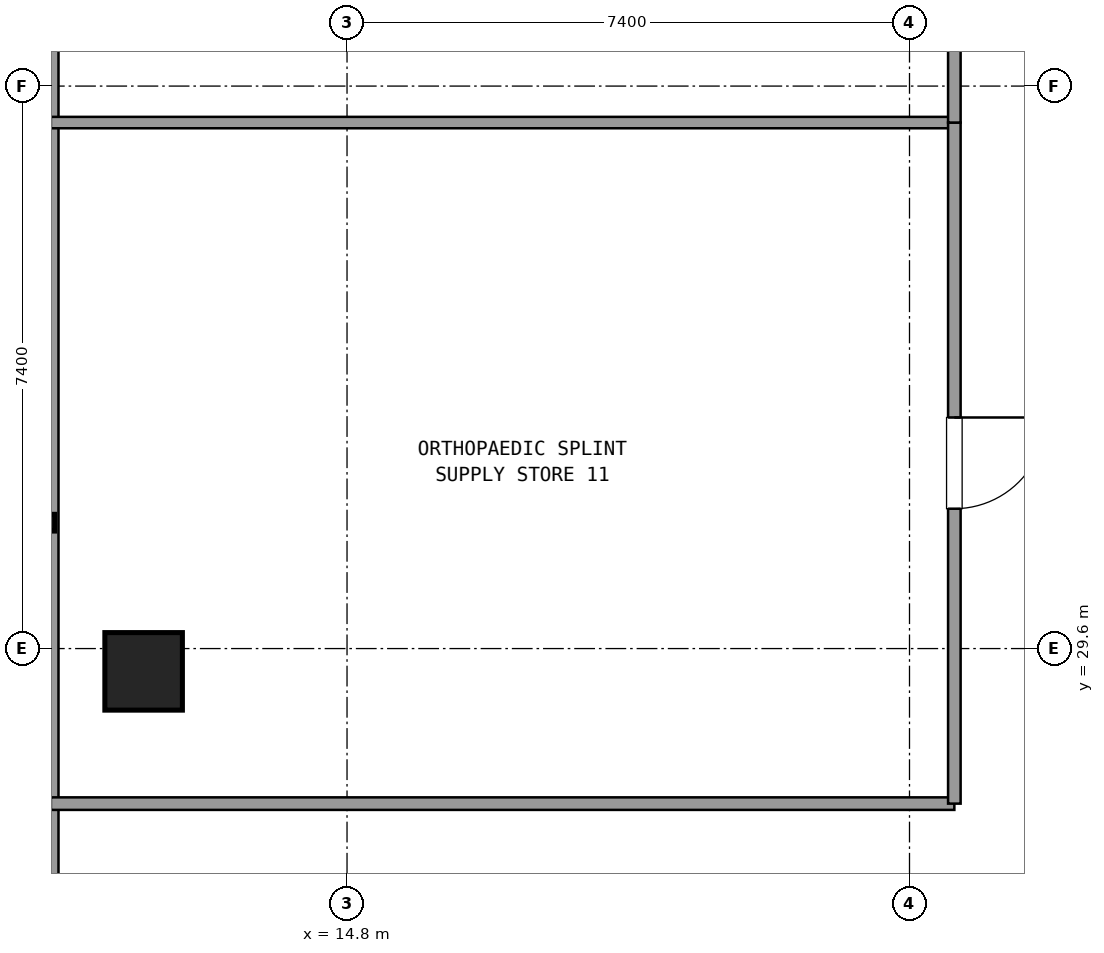
"""IFC4 building model, lengths in metres.
Left out: names, types, materials, properties, quantities, classifications, styles, units other than length and angle.
Written with IfcOpenShell. Run it as: python <this file> out.ifc"""

import sys

from ifc_helpers import new_model, si_unit, direction, frame, frame_2d, origin, origin_2d, place, context, subcontext, project, spatial, rectangle, extrude, element, fill, save


model = new_model("IFC4")
c1 = context("Model", 3, precision=1e-05, world=origin(), true_north=direction((0.0, 1.0)))
c2 = subcontext(c1, "Body", "Model", "MODEL_VIEW")
j1 = project(units=[si_unit("LENGTHUNIT", "METRE"), si_unit("PLANEANGLEUNIT", "RADIAN")], contexts=[c1])
p1 = place(None, origin())
s1 = spatial("IfcSite", under=j1, at=p1, CompositionType="ELEMENT")
p2 = place(p1, origin())
s2 = spatial("IfcBuilding", under=s1, at=p2, CompositionType="ELEMENT")
p3 = place(p2, frame((0.0, 0.0, 95.58)))
s3 = spatial("IfcBuildingStorey", under=s2, at=p3, CompositionType="ELEMENT", Elevation=95.58)
p4 = place(p3, frame((12.124, 29.3, 0.021), z_axis=(0.084850379912, 0.0, 0.996393703828), x_axis=(0.0, 1.0, 0.0)))
e1 = element("IfcColumn", 1, at=p4, inside=s3, PredefinedType="COLUMN", context=c2, shape_type="SweptSolid", body=[
    extrude(rectangle(XDim=1.02, YDim=1.02, at=origin_2d()), origin(), (0.0, 0.0, 1.0), 3.571),
])
p5 = place(p3, frame((10.884, 41.968, 0.0), z_axis=(0.0, 0.0, 1.0), x_axis=(0.0, -1.0, 0.0)))
e2 = element("IfcWall", 2, at=p5, inside=s3, PredefinedType="SOLIDWALL", context=c2, shape_type="SweptSolid", body=[
    extrude(rectangle(XDim=32.136, YDim=0.24, at=frame_2d((16.068, 0.0))), origin(), (0.0, 0.0, 1.0), 0.85),
])
p6 = place(p3, frame((10.904, 27.56, 0.0), z_axis=(0.0, 0.0, 1.0), x_axis=(1.0, 0.0, 0.0)))
e3 = element("IfcWall", 3, at=p6, inside=s3, PredefinedType="PARTITIONING", context=c2, shape_type="SweptSolid", body=[
    extrude(rectangle(XDim=11.886, YDim=0.165, at=frame_2d((5.943, 0.0))), origin(), (0.0, 0.0, 1.0), 2.61),
])
p7 = place(p3, frame((22.79, 36.52, 0.0), z_axis=(0.0, 0.0, 1.0), x_axis=(-1.0, 0.0, 0.0)))
e4 = element("IfcWall", 4, at=p7, inside=s3, PredefinedType="PARTITIONING", context=c2, shape_type="SweptSolid", body=[
    extrude(rectangle(XDim=11.886, YDim=0.15, at=frame_2d((5.943, 0.0))), origin(), (0.0, 0.0, 1.0), 2.61),
])
p8 = place(p3, frame((22.79, 27.56, 0.0), z_axis=(0.0, 0.0, 1.0), x_axis=(0.0, 1.0, 0.0)))
e5 = element("IfcWall", 5, at=p8, inside=s3, PredefinedType="PARTITIONING", context=c2, shape_type="SweptSolid", body=[
    extrude(rectangle(XDim=8.96, YDim=0.165, at=frame_2d((4.48, 0.0))), origin(), (0.0, 0.0, 1.0), 2.61),
])
p9 = place(p8, frame((3.88, 0.0, 0.0)))
e6 = element("IfcOpeningElement", 6, at=p9, cuts=e5, PredefinedType="OPENING", context=c2, shape_type="SweptSolid", body=[
    extrude(rectangle(XDim=1.2, YDim=2.15, at=frame_2d((0.6, 1.075))), frame((0.0, 0.093, 0.0), z_axis=(0.0, -1.0, 0.0), x_axis=(1.0, 0.0, 0.0)), (0.0, 0.0, 1.0), 0.185),
])
p10 = place(p3, frame((22.79, 36.52, 0.0), z_axis=(0.0, 0.0, 1.0), x_axis=(0.0, 1.0, 0.0)))
e7 = element("IfcWall", 7, at=p10, inside=s3, PredefinedType="PARTITIONING", context=c2, shape_type="SweptSolid", body=[
    extrude(rectangle(XDim=11.403, YDim=0.165, at=frame_2d((5.702, 0.0))), origin(), (0.0, 0.0, 1.0), 2.61),
])
p11 = place(p10, frame((5.101, 0.0, 0.0)))
e8 = element("IfcOpeningElement", 8, at=p11, cuts=e7, PredefinedType="OPENING", context=c2, shape_type="SweptSolid", body=[
    extrude(rectangle(XDim=1.2, YDim=2.15, at=frame_2d((0.6, 1.075))), frame((0.0, 0.093, 0.0), z_axis=(0.0, -1.0, 0.0), x_axis=(1.0, 0.0, 0.0)), (0.0, 0.0, 1.0), 0.185),
])
p12 = place(p9, frame((1.2, 0.0, 0.0), z_axis=(0.0, 0.0, 1.0), x_axis=(-1.0, 0.0, 0.0)))
e9 = element("IfcDoor", 9, at=p12, inside=s3, OperationType="SINGLE_SWING_RIGHT", PredefinedType="DOOR", context=c2, shape_type="SweptSolid", body=[
    extrude(rectangle(XDim=1.2, YDim=2.15, at=frame_2d((0.6, 1.075))), frame((0.0, 0.025, 0.0), z_axis=(0.0, -1.0, 0.0), x_axis=(1.0, 0.0, 0.0)), (0.0, 0.0, 1.0), 0.05),
])
fill(e6, e9)
save(model, sys.argv[1])
